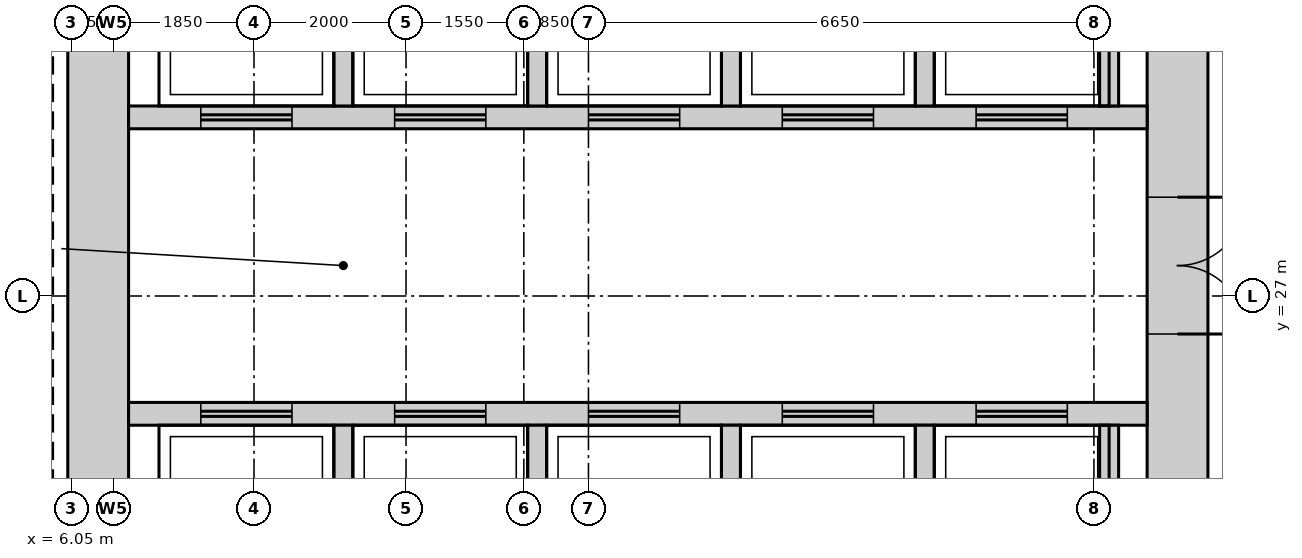
"""IFC4 building model, lengths in metres.
Left out: names, types, materials, properties, quantities, classifications, styles, units other than length and angle.
Written with IfcOpenShell. Run it as: python <this file> out.ifc"""

import sys

from ifc_helpers import new_model, si_unit, direction, frame, frame_2d, origin, place, context, subcontext, project, spatial, rectangle, extrude, source, transform, mapped, element, fill, save


model = new_model("IFC4")
c1 = context("Model", 3, precision=1e-05, world=origin(), true_north=direction((0.0, 1.0)))
c2 = subcontext(c1, "Body", "Model", "MODEL_VIEW")
j1 = project(units=[si_unit("LENGTHUNIT", "METRE"), si_unit("PLANEANGLEUNIT", "RADIAN")], contexts=[c1])
p1 = place(None, origin())
s1 = spatial("IfcSite", under=j1, at=p1, CompositionType="ELEMENT")
p2 = place(p1, origin())
s2 = spatial("IfcBuilding", under=s1, at=p2, CompositionType="ELEMENT")
p3 = place(p2, frame((0.0, 0.0, 196.7)))
s3 = spatial("IfcBuildingStorey", under=s2, at=p3, CompositionType="ELEMENT", Elevation=196.7)
m1 = source(origin(), c2, "Body", "SweptSolid", [
    extrude(rectangle(XDim=22.4, YDim=0.8, at=frame_2d((11.2, 0.0))), origin(), (0.0, 0.0, 1.0), 3.75),
])
p4 = place(p3, frame((20.6, 15.8, 0.0), z_axis=(0.0, 0.0, 1.0), x_axis=(0.0, 1.0, 0.0)))
e1 = element("IfcWall", 1, at=p4, inside=s3, PredefinedType="SHEAR", context=c2, shape_type="MappedRepresentation", body=[
    mapped(m1, transform((0.0, 0.0, 0.0))),
])
m2 = source(origin(), c2, "Body", "SweptSolid", [
    extrude(rectangle(XDim=1.8, YDim=2.1, at=frame_2d((0.9, 1.05))), frame((0.0, 0.41, 0.0), z_axis=(0.0, -1.0, 0.0), x_axis=(1.0, 0.0, 0.0)), (0.0, 0.0, 1.0), 0.82),
])
p5 = place(p4, frame((10.7, 0.0, 0.0)))
e2 = element("IfcOpeningElement", 2, at=p5, cuts=e1, PredefinedType="OPENING", context=c2, shape_type="MappedRepresentation", body=[
    mapped(m2, transform((0.0, 0.0, 0.0))),
])
m3 = source(origin(), c2, "Body", "SweptSolid", [
    extrude(rectangle(XDim=0.9, YDim=2.1, at=frame_2d((0.45, 1.05))), frame((0.0, 0.41, 0.0), z_axis=(0.0, -1.0, 0.0), x_axis=(1.0, 0.0, 0.0)), (0.0, 0.0, 1.0), 0.82),
])
p6 = place(p4, frame((0.35, 0.0, 0.0)))
e3 = element("IfcOpeningElement", 3, at=p6, cuts=e1, PredefinedType="OPENING", context=c2, shape_type="MappedRepresentation", body=[
    mapped(m3, transform((0.0, 0.0, 0.0))),
])
p7 = place(p4, frame((2.15, 0.0, 0.0)))
e4 = element("IfcOpeningElement", 4, at=p7, cuts=e1, PredefinedType="OPENING", context=c2, shape_type="MappedRepresentation", body=[
    mapped(m3, transform((0.0, 0.0, 0.0))),
])
m4 = source(origin(), c2, "Body", "SweptSolid", [
    extrude(rectangle(XDim=1.0, YDim=2.1, at=frame_2d((0.5, 1.05))), frame((0.0, 0.41, 0.0), z_axis=(0.0, -1.0, 0.0), x_axis=(1.0, 0.0, 0.0)), (0.0, 0.0, 1.0), 0.82),
])
p8 = place(p4, frame((4.85, 0.0, 0.0)))
e5 = element("IfcOpeningElement", 5, at=p8, cuts=e1, PredefinedType="OPENING", context=c2, shape_type="MappedRepresentation", body=[
    mapped(m4, transform((0.0, 0.0, 0.0))),
])
p9 = place(p3, frame((6.4, 15.8, 0.0), z_axis=(0.0, 0.0, 1.0), x_axis=(0.0, 1.0, 0.0)))
e6 = element("IfcWall", 6, at=p9, inside=s3, PredefinedType="SHEAR", context=c2, shape_type="MappedRepresentation", body=[
    mapped(m1, transform((0.0, 0.0, 0.0))),
])
m5 = source(origin(), c2, "Body", "SweptSolid", [
    extrude(rectangle(XDim=13.4, YDim=0.3, at=frame_2d((6.7, 0.0))), origin(), (0.0, 0.0, 1.0), 3.75),
])
p10 = place(p3, frame((6.8, 29.35, 0.0), z_axis=(0.0, 0.0, 1.0), x_axis=(1.0, 0.0, 0.0)))
e7 = element("IfcWall", 7, at=p10, inside=s3, PredefinedType="STANDARD", context=c2, shape_type="MappedRepresentation", body=[
    mapped(m5, transform((0.0, 0.0, 0.0))),
])
m6 = source(origin(), c2, "Body", "SweptSolid", [
    extrude(rectangle(XDim=1.2, YDim=2.1, at=frame_2d((0.6, 1.05))), frame((0.0, 0.16, 0.0), z_axis=(0.0, -1.0, 0.0), x_axis=(1.0, 0.0, 0.0)), (0.0, 0.0, 1.0), 0.32),
])
p11 = place(p10, frame((0.95, 0.0, 0.0)))
e8 = element("IfcOpeningElement", 8, at=p11, cuts=e7, PredefinedType="OPENING", context=c2, shape_type="MappedRepresentation", body=[
    mapped(m6, transform((0.0, 0.0, 0.0))),
])
p12 = place(p10, frame((3.5, 0.0, 0.0)))
e9 = element("IfcOpeningElement", 9, at=p12, cuts=e7, PredefinedType="OPENING", context=c2, shape_type="MappedRepresentation", body=[
    mapped(m6, transform((0.0, 0.0, 0.0))),
])
p13 = place(p10, frame((6.05, 0.0, 0.0)))
e10 = element("IfcOpeningElement", 10, at=p13, cuts=e7, PredefinedType="OPENING", context=c2, shape_type="MappedRepresentation", body=[
    mapped(m6, transform((0.0, 0.0, 0.0))),
])
p14 = place(p10, frame((8.6, 0.0, 0.0)))
e11 = element("IfcOpeningElement", 11, at=p14, cuts=e7, PredefinedType="OPENING", context=c2, shape_type="MappedRepresentation", body=[
    mapped(m6, transform((0.0, 0.0, 0.0))),
])
p15 = place(p10, frame((11.15, 0.0, 0.0)))
e12 = element("IfcOpeningElement", 12, at=p15, cuts=e7, PredefinedType="OPENING", context=c2, shape_type="MappedRepresentation", body=[
    mapped(m6, transform((0.0, 0.0, 0.0))),
])
p16 = place(p3, frame((6.8, 25.45, 0.0), z_axis=(0.0, 0.0, 1.0), x_axis=(1.0, 0.0, 0.0)))
e13 = element("IfcWall", 13, at=p16, inside=s3, PredefinedType="STANDARD", context=c2, shape_type="MappedRepresentation", body=[
    mapped(m5, transform((0.0, 0.0, 0.0))),
])
p17 = place(p16, frame((0.95, 0.0, 0.0)))
e14 = element("IfcOpeningElement", 14, at=p17, cuts=e13, PredefinedType="OPENING", context=c2, shape_type="MappedRepresentation", body=[
    mapped(m6, transform((0.0, 0.0, 0.0))),
])
p18 = place(p16, frame((3.5, 0.0, 0.0)))
e15 = element("IfcOpeningElement", 15, at=p18, cuts=e13, PredefinedType="OPENING", context=c2, shape_type="MappedRepresentation", body=[
    mapped(m6, transform((0.0, 0.0, 0.0))),
])
p19 = place(p16, frame((6.05, 0.0, 0.0)))
e16 = element("IfcOpeningElement", 16, at=p19, cuts=e13, PredefinedType="OPENING", context=c2, shape_type="MappedRepresentation", body=[
    mapped(m6, transform((0.0, 0.0, 0.0))),
])
p20 = place(p16, frame((8.6, 0.0, 0.0)))
e17 = element("IfcOpeningElement", 17, at=p20, cuts=e13, PredefinedType="OPENING", context=c2, shape_type="MappedRepresentation", body=[
    mapped(m6, transform((0.0, 0.0, 0.0))),
])
p21 = place(p16, frame((11.15, 0.0, 0.0)))
e18 = element("IfcOpeningElement", 18, at=p21, cuts=e13, PredefinedType="OPENING", context=c2, shape_type="MappedRepresentation", body=[
    mapped(m6, transform((0.0, 0.0, 0.0))),
])
m7 = source(origin(), c2, "Body", "SweptSolid", [
    extrude(rectangle(XDim=2.4, YDim=0.25, at=frame_2d((1.2, 0.0))), origin(), (0.0, 0.0, 1.0), 3.75),
])
for number, where, z_axis, x_axis in (
    (19, (17.275, 29.5, 0.0), (0.0, 0.0, 1.0), (0.0, 1.0, 0.0)),
    (20, (19.7, 29.5, 0.0), (0.0, 0.0, 1.0), (0.0, 1.0, 0.0)),
    (21, (9.625, 29.5, 0.0), (0.0, 0.0, 1.0), (0.0, 1.0, 0.0)),
    (22, (12.175, 29.5, 0.0), (0.0, 0.0, 1.0), (0.0, 1.0, 0.0)),
    (23, (14.725, 29.5, 0.0), (0.0, 0.0, 1.0), (0.0, 1.0, 0.0)),
):
    element("IfcWall", number, at=place(p3, frame(where, z_axis=z_axis, x_axis=x_axis)), inside=s3, PredefinedType="STANDARD", context=c2, shape_type="MappedRepresentation", body=[
        mapped(m7, transform((0.0, 0.0, 0.0))),
    ])
m8 = source(origin(), c2, "Body", "SweptSolid", [
    extrude(rectangle(XDim=2.4, YDim=0.25, at=frame_2d((1.2, 0.0))), origin(), (0.0, 0.0, 1.0), 3.75),
])
for number, where, z_axis, x_axis in (
    (24, (17.275, 22.9, 0.0), (0.0, 0.0, 1.0), (0.0, 1.0, 0.0)),
    (25, (19.7, 22.9, 0.0), (0.0, 0.0, 1.0), (0.0, 1.0, 0.0)),
    (26, (9.625, 22.9, 0.0), (0.0, 0.0, 1.0), (0.0, 1.0, 0.0)),
    (27, (12.175, 22.9, 0.0), (0.0, 0.0, 1.0), (0.0, 1.0, 0.0)),
    (28, (14.725, 22.9, 0.0), (0.0, 0.0, 1.0), (0.0, 1.0, 0.0)),
):
    element("IfcWall", number, at=place(p3, frame(where, z_axis=z_axis, x_axis=x_axis)), inside=s3, PredefinedType="STANDARD", context=c2, shape_type="MappedRepresentation", body=[
        mapped(m8, transform((0.0, 0.0, 0.0))),
    ])
m9 = source(origin(), c2, "Body", "SweptSolid", [
    extrude(rectangle(XDim=1.8, YDim=2.1, at=frame_2d((0.9, 1.05))), frame((0.0, 0.35, 0.0), z_axis=(0.0, -1.0, 0.0), x_axis=(1.0, 0.0, 0.0)), (0.0, 0.0, 1.0), 0.7),
])
p22 = place(p5, origin())
e29 = element("IfcDoor", 29, at=p22, inside=s3, OperationType="DOUBLE_DOOR_SINGLE_SWING", PredefinedType="DOOR", context=c2, shape_type="MappedRepresentation", body=[
    mapped(m9, transform((0.0, 0.0, 0.0))),
])
fill(e2, e29)
m10 = source(origin(), c2, "Body", "SweptSolid", [
    extrude(rectangle(XDim=1.2, YDim=2.1, at=frame_2d((0.6, 1.05))), frame((0.0, 0.025, 0.0), z_axis=(0.0, -1.0, 0.0), x_axis=(1.0, 0.0, 0.0)), (0.0, 0.0, 1.0), 0.05),
])
p23 = place(p17, origin())
e30 = element("IfcDoor", 30, at=p23, inside=s3, OperationType="DOUBLE_DOOR_SLIDING", PredefinedType="DOOR", context=c2, shape_type="MappedRepresentation", body=[
    mapped(m10, transform((0.0, 0.0, 0.0))),
])
fill(e14, e30)
p24 = place(p18, origin())
e31 = element("IfcDoor", 31, at=p24, inside=s3, OperationType="DOUBLE_DOOR_SLIDING", PredefinedType="DOOR", context=c2, shape_type="MappedRepresentation", body=[
    mapped(m10, transform((0.0, 0.0, 0.0))),
])
fill(e15, e31)
p25 = place(p19, origin())
e32 = element("IfcDoor", 32, at=p25, inside=s3, OperationType="DOUBLE_DOOR_SLIDING", PredefinedType="DOOR", context=c2, shape_type="MappedRepresentation", body=[
    mapped(m10, transform((0.0, 0.0, 0.0))),
])
fill(e16, e32)
p26 = place(p20, origin())
e33 = element("IfcDoor", 33, at=p26, inside=s3, OperationType="DOUBLE_DOOR_SLIDING", PredefinedType="DOOR", context=c2, shape_type="MappedRepresentation", body=[
    mapped(m10, transform((0.0, 0.0, 0.0))),
])
fill(e17, e33)
p27 = place(p21, origin())
e34 = element("IfcDoor", 34, at=p27, inside=s3, OperationType="DOUBLE_DOOR_SLIDING", PredefinedType="DOOR", context=c2, shape_type="MappedRepresentation", body=[
    mapped(m10, transform((0.0, 0.0, 0.0))),
])
fill(e18, e34)
p28 = place(p11, origin())
e35 = element("IfcDoor", 35, at=p28, inside=s3, OperationType="DOUBLE_DOOR_SLIDING", PredefinedType="DOOR", context=c2, shape_type="MappedRepresentation", body=[
    mapped(m10, transform((0.0, 0.0, 0.0))),
])
fill(e8, e35)
p29 = place(p12, origin())
e36 = element("IfcDoor", 36, at=p29, inside=s3, OperationType="DOUBLE_DOOR_SLIDING", PredefinedType="DOOR", context=c2, shape_type="MappedRepresentation", body=[
    mapped(m10, transform((0.0, 0.0, 0.0))),
])
fill(e9, e36)
p30 = place(p13, origin())
e37 = element("IfcDoor", 37, at=p30, inside=s3, OperationType="DOUBLE_DOOR_SLIDING", PredefinedType="DOOR", context=c2, shape_type="MappedRepresentation", body=[
    mapped(m10, transform((0.0, 0.0, 0.0))),
])
fill(e10, e37)
p31 = place(p14, origin())
e38 = element("IfcDoor", 38, at=p31, inside=s3, OperationType="DOUBLE_DOOR_SLIDING", PredefinedType="DOOR", context=c2, shape_type="MappedRepresentation", body=[
    mapped(m10, transform((0.0, 0.0, 0.0))),
])
fill(e11, e38)
p32 = place(p15, origin())
e39 = element("IfcDoor", 39, at=p32, inside=s3, OperationType="DOUBLE_DOOR_SLIDING", PredefinedType="DOOR", context=c2, shape_type="MappedRepresentation", body=[
    mapped(m10, transform((0.0, 0.0, 0.0))),
])
fill(e12, e39)
save(model, sys.argv[1])
